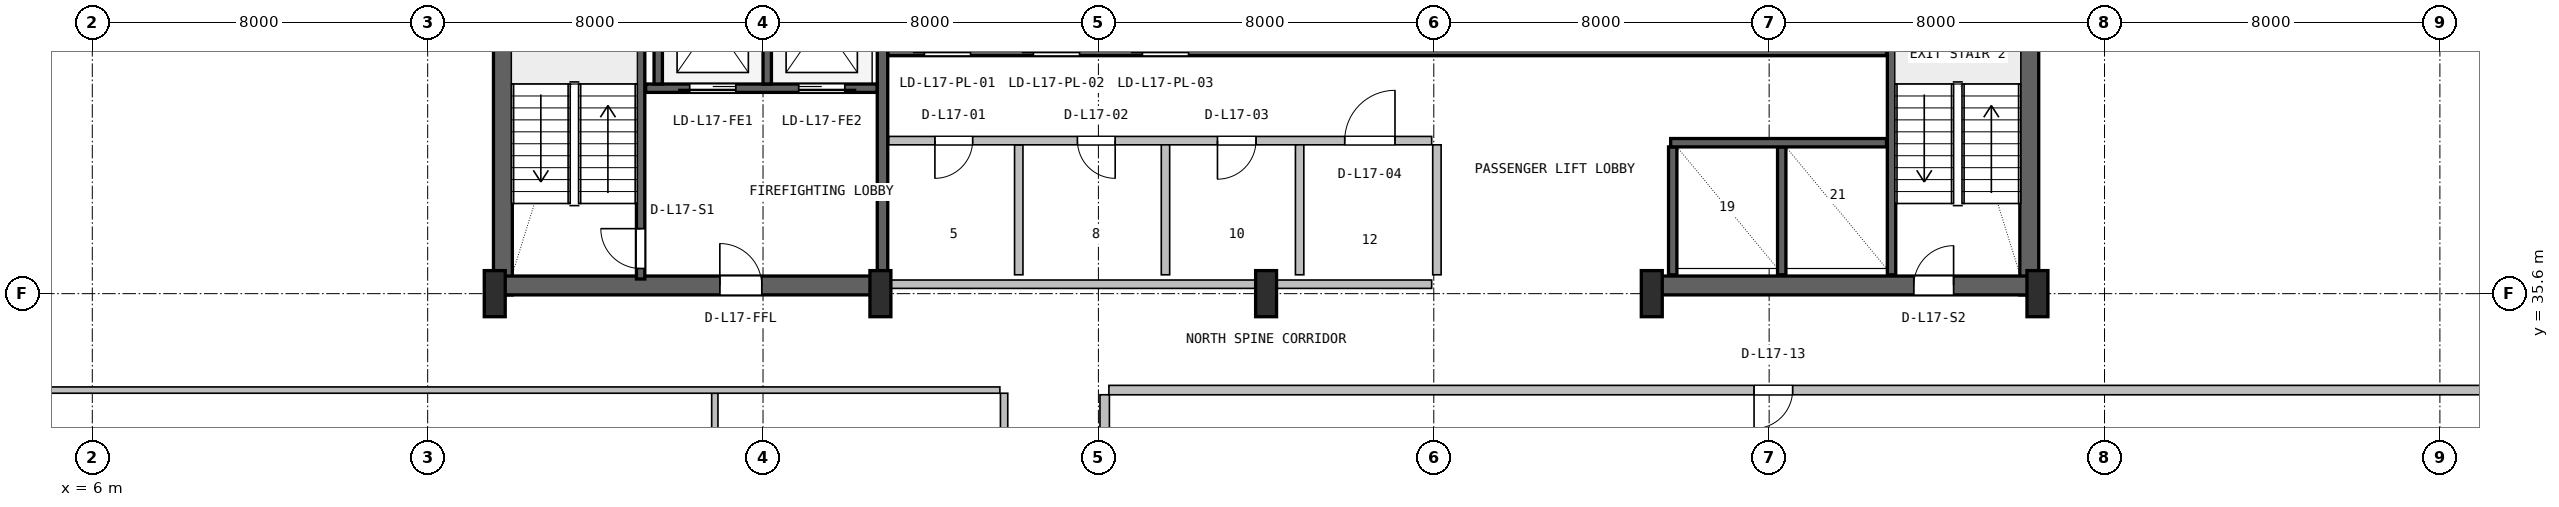
"""IFC4 building model, lengths in metres.
Left out: names, types, materials, properties, quantities, classifications, styles, units other than length and angle.
Written with IfcOpenShell. Run it as: python <this file> out.ifc"""

import sys

from ifc_helpers import new_model, si_unit, direction, frame, frame_2d, origin, origin_2d, place, context, subcontext, project, spatial, rectangle, i_section, extrude, source, transform, mapped, element, fill, save


model = new_model("IFC4")
c1 = context("Model", 3, precision=1e-05, world=origin(), true_north=direction((0.0, 1.0)))
c2 = subcontext(c1, "Body", "Model", "MODEL_VIEW")
j1 = project(units=[si_unit("LENGTHUNIT", "METRE"), si_unit("PLANEANGLEUNIT", "RADIAN")], contexts=[c1])
p1 = place(None, origin())
s1 = spatial("IfcSite", under=j1, at=p1, CompositionType="ELEMENT")
p2 = place(p1, origin())
s2 = spatial("IfcBuilding", under=s1, at=p2, CompositionType="ELEMENT")
p3 = place(p2, frame((0.0, 0.0, 74.4)))
s3 = spatial("IfcBuildingStorey", under=s2, at=p3, CompositionType="ELEMENT", Elevation=74.4)
for number, where, z_axis, x_axis in (
    (1, (15.795, 35.57, 0.0), (0.0, 0.0, 1.0), (0.0, 1.0, 0.0)),
    (2, (52.205, 35.57, 0.0), (0.0, 0.0, 1.0), (0.0, 1.0, 0.0)),
):
    element("IfcWall", number, at=place(p3, frame(where, z_axis=z_axis, x_axis=x_axis)), inside=s3, PredefinedType="SHEAR", context=c2, shape_type="SweptSolid", body=[
        extrude(rectangle(XDim=11.23, YDim=0.45, at=frame_2d((5.615, 0.0))), origin(), (0.0, 0.0, 1.0), 3.65),
    ])
p4 = place(p3, frame((15.57, 35.795, 0.0), z_axis=(0.0, 0.0, 1.0), x_axis=(1.0, 0.0, 0.0)))
e3 = element("IfcWall", 3, at=p4, inside=s3, PredefinedType="SHEAR", context=c2, shape_type="SweptSolid", body=[
    extrude(rectangle(XDim=9.23, YDim=0.45, at=frame_2d((4.615, 0.0))), origin(), (0.0, 0.0, 1.0), 3.65),
])
p5 = place(p4, frame((5.4, 0.0, 0.0)))
e4 = element("IfcOpeningElement", 4, at=p5, cuts=e3, PredefinedType="OPENING", context=c2, shape_type="SweptSolid", body=[
    extrude(rectangle(XDim=1.0, YDim=2.1, at=frame_2d((0.5, 1.05))), frame((0.0, 0.235, 0.0), z_axis=(0.0, -1.0, 0.0), x_axis=(1.0, 0.0, 0.0)), (0.0, 0.0, 1.0), 0.47),
])
p6 = place(p3, frame((43.2, 35.795, 0.0), z_axis=(0.0, 0.0, 1.0), x_axis=(1.0, 0.0, 0.0)))
e5 = element("IfcWall", 5, at=p6, inside=s3, PredefinedType="SHEAR", context=c2, shape_type="SweptSolid", body=[
    extrude(rectangle(XDim=9.23, YDim=0.45, at=frame_2d((4.615, 0.0))), origin(), (0.0, 0.0, 1.0), 3.65),
])
p7 = place(p6, frame((6.25, 0.0, 0.0)))
e6 = element("IfcOpeningElement", 6, at=p7, cuts=e5, PredefinedType="OPENING", context=c2, shape_type="SweptSolid", body=[
    extrude(rectangle(XDim=0.95, YDim=2.1, at=frame_2d((0.475, 1.05))), frame((0.0, 0.235, 0.0), z_axis=(0.0, -1.0, 0.0), x_axis=(1.0, 0.0, 0.0)), (0.0, 0.0, 1.0), 0.47),
])
m1 = source(origin(), c2, "Body", "SweptSolid", [
    extrude(i_section(OverallWidth=0.5, OverallDepth=1.1, WebThickness=0.018, FlangeThickness=0.032, FilletRadius=0.018, at=origin_2d()), origin(), (0.0, 0.0, 1.0), 3.9),
])
for number, where, z_axis, x_axis in (
    (7, (15.6, 35.6, 0.0), (0.0, 0.0, 1.0), (1.0, 0.0, 0.0)),
    (8, (24.8, 35.6, 0.0), (0.0, 0.0, 1.0), (1.0, 0.0, 0.0)),
    (9, (34.0, 35.6, 0.0), (0.0, 0.0, 1.0), (1.0, 0.0, 0.0)),
    (10, (43.2, 35.6, 0.0), (0.0, 0.0, 1.0), (1.0, 0.0, 0.0)),
    (11, (52.4, 35.6, 0.0), (0.0, 0.0, 1.0), (1.0, 0.0, 0.0)),
):
    element("IfcColumn", number, at=place(p3, frame(where, z_axis=z_axis, x_axis=x_axis)), inside=s3, PredefinedType="COLUMN", context=c2, shape_type="MappedRepresentation", body=[
        mapped(m1, transform((0.0, 0.0, 0.0), x_axis=(1.0, 0.0, 0.0), y_axis=(0.0, 1.0, 0.0), z_axis=(0.0, 0.0, 1.0), scale=1.0)),
    ])
p8 = place(p3, frame((19.08, 35.95, 0.0), z_axis=(0.0, 0.0, 1.0), x_axis=(0.0, 1.0, 0.0)))
e12 = element("IfcWall", 12, at=p8, inside=s3, PredefinedType="SHEAR", context=c2, shape_type="SweptSolid", body=[
    extrude(rectangle(XDim=9.65, YDim=0.2, at=frame_2d((4.825, 0.0))), origin(), (0.0, 0.0, 1.0), 3.65),
])
p9 = place(p8, frame((0.25, 0.0, 0.0)))
e13 = element("IfcOpeningElement", 13, at=p9, cuts=e12, PredefinedType="OPENING", context=c2, shape_type="SweptSolid", body=[
    extrude(rectangle(XDim=0.95, YDim=2.1, at=frame_2d((0.475, 1.05))), frame((0.0, 0.11, 0.0), z_axis=(0.0, -1.0, 0.0), x_axis=(1.0, 0.0, 0.0)), (0.0, 0.0, 1.0), 0.22),
])
p10 = place(p3, frame((24.85, 36.05, 0.0), z_axis=(0.0, 0.0, 1.0), x_axis=(0.0, 1.0, 0.0)))
e14 = element("IfcWall", 14, at=p10, inside=s3, PredefinedType="SHEAR", context=c2, shape_type="SweptSolid", body=[
    extrude(rectangle(XDim=10.45, YDim=0.25, at=frame_2d((5.225, 0.0))), origin(), (0.0, 0.0, 1.0), 3.65),
])
p11 = place(p3, frame((19.2, 40.5, 0.0), z_axis=(0.0, 0.0, 1.0), x_axis=(1.0, 0.0, 0.0)))
e15 = element("IfcWall", 15, at=p11, inside=s3, PredefinedType="SHEAR", context=c2, shape_type="SweptSolid", body=[
    extrude(rectangle(XDim=5.52, YDim=0.2, at=frame_2d((2.76, 0.0))), origin(), (0.0, 0.0, 1.0), 3.65),
])
p12 = place(p11, frame((1.05, 0.0, 0.0)))
e16 = element("IfcOpeningElement", 16, at=p12, cuts=e15, PredefinedType="OPENING", context=c2, shape_type="SweptSolid", body=[
    extrude(rectangle(XDim=1.1, YDim=2.18, at=frame_2d((0.55, 1.09))), frame((0.0, 0.11, 0.0), z_axis=(0.0, -1.0, 0.0), x_axis=(1.0, 0.0, 0.0)), (0.0, 0.0, 1.0), 0.22),
])
p13 = place(p11, frame((3.65, 0.0, 0.0)))
e17 = element("IfcOpeningElement", 17, at=p13, cuts=e15, PredefinedType="OPENING", context=c2, shape_type="SweptSolid", body=[
    extrude(rectangle(XDim=1.1, YDim=2.18, at=frame_2d((0.55, 1.09))), frame((0.0, 0.11, 0.0), z_axis=(0.0, -1.0, 0.0), x_axis=(1.0, 0.0, 0.0)), (0.0, 0.0, 1.0), 0.22),
])
p14 = place(p3, frame((22.1, 40.6, 0.0), z_axis=(0.0, 0.0, 1.0), x_axis=(0.0, 1.0, 0.0)))
e18 = element("IfcWall", 18, at=p14, inside=s3, PredefinedType="SHEAR", context=c2, shape_type="SweptSolid", body=[
    extrude(rectangle(XDim=3.0, YDim=0.2, at=frame_2d((1.5, 0.0))), origin(), (0.0, 0.0, 1.0), 3.65),
])
p15 = place(p3, frame((19.5, 40.6, 0.0), z_axis=(0.0, 0.0, 1.0), x_axis=(0.0, 1.0, 0.0)))
e19 = element("IfcWall", 19, at=p15, inside=s3, PredefinedType="SHEAR", context=c2, shape_type="SweptSolid", body=[
    extrude(rectangle(XDim=5.95, YDim=0.2, at=frame_2d((2.975, 0.0))), origin(), (0.0, 0.0, 1.0), 3.65),
])
p16 = place(p3, frame((48.92, 36.05, 0.0), z_axis=(0.0, 0.0, 1.0), x_axis=(0.0, 1.0, 0.0)))
e20 = element("IfcWall", 20, at=p16, inside=s3, PredefinedType="SHEAR", context=c2, shape_type="SweptSolid", body=[
    extrude(rectangle(XDim=10.5, YDim=0.2, at=frame_2d((5.25, 0.0))), origin(), (0.0, 0.0, 1.0), 3.65),
])
p17 = place(p3, frame((24.98, 41.4, 0.0), z_axis=(0.0, 0.0, 1.0), x_axis=(1.0, 0.0, 0.0)))
e21 = element("IfcWall", 21, at=p17, inside=s3, PredefinedType="SHEAR", context=c2, shape_type="SweptSolid", body=[
    extrude(rectangle(XDim=23.82, YDim=0.25, at=frame_2d((11.91, 0.0))), origin(), (0.0, 0.0, 1.0), 3.65),
])
p18 = place(p17, frame((0.87, 0.0, 0.0)))
e22 = element("IfcOpeningElement", 22, at=p18, cuts=e21, PredefinedType="OPENING", context=c2, shape_type="SweptSolid", body=[
    extrude(rectangle(XDim=1.1, YDim=2.18, at=frame_2d((0.55, 1.09))), frame((0.0, 0.135, 0.0), z_axis=(0.0, -1.0, 0.0), x_axis=(1.0, 0.0, 0.0)), (0.0, 0.0, 1.0), 0.27),
])
p19 = place(p17, frame((3.47, 0.0, 0.0)))
e23 = element("IfcOpeningElement", 23, at=p19, cuts=e21, PredefinedType="OPENING", context=c2, shape_type="SweptSolid", body=[
    extrude(rectangle(XDim=1.1, YDim=2.18, at=frame_2d((0.55, 1.09))), frame((0.0, 0.135, 0.0), z_axis=(0.0, -1.0, 0.0), x_axis=(1.0, 0.0, 0.0)), (0.0, 0.0, 1.0), 0.27),
])
p20 = place(p17, frame((6.07, 0.0, 0.0)))
e24 = element("IfcOpeningElement", 24, at=p20, cuts=e21, PredefinedType="OPENING", context=c2, shape_type="SweptSolid", body=[
    extrude(rectangle(XDim=1.1, YDim=2.18, at=frame_2d((0.55, 1.09))), frame((0.0, 0.135, 0.0), z_axis=(0.0, -1.0, 0.0), x_axis=(1.0, 0.0, 0.0)), (0.0, 0.0, 1.0), 0.27),
])
for number, where, z_axis, x_axis in (
    (25, (43.7, 36.05, 0.0), (0.0, 0.0, 1.0), (0.0, 1.0, 0.0)),
    (26, (46.3, 36.05, 0.0), (0.0, 0.0, 1.0), (0.0, 1.0, 0.0)),
):
    element("IfcWall", number, at=place(p3, frame(where, z_axis=z_axis, x_axis=x_axis)), inside=s3, PredefinedType="SHEAR", context=c2, shape_type="SweptSolid", body=[
        extrude(rectangle(XDim=3.05, YDim=0.2, at=frame_2d((1.525, 0.0))), origin(), (0.0, 0.0, 1.0), 3.65),
    ])
p21 = place(p3, frame((43.65, 39.2, 0.0), z_axis=(0.0, 0.0, 1.0), x_axis=(1.0, 0.0, 0.0)))
e27 = element("IfcWall", 27, at=p21, inside=s3, PredefinedType="SHEAR", context=c2, shape_type="SweptSolid", body=[
    extrude(rectangle(XDim=5.15, YDim=0.2, at=frame_2d((2.575, 0.0))), origin(), (0.0, 0.0, 1.0), 3.65),
])
p22 = place(p3, frame((25.0, 35.825, 0.0), z_axis=(0.0, 0.0, 1.0), x_axis=(1.0, 0.0, 0.0)))
e28 = element("IfcWall", 28, at=p22, inside=s3, PredefinedType="SOLIDWALL", context=c2, shape_type="SweptSolid", body=[
    extrude(rectangle(XDim=12.95, YDim=0.2, at=frame_2d((6.475, 0.0))), origin(), (0.0, 0.0, 1.0), 2.425),
])
p23 = place(p3, frame((28.1, 36.05, 0.0), z_axis=(0.0, 0.0, 1.0), x_axis=(0.0, 1.0, 0.0)))
e29 = element("IfcWall", 29, at=p23, inside=s3, PredefinedType="PLUMBINGWALL", context=c2, shape_type="SweptSolid", body=[
    extrude(rectangle(XDim=3.1, YDim=0.2, at=frame_2d((1.55, 0.0))), origin(), (0.0, 0.0, 1.0), 3.63),
])
p24 = place(p3, frame((25.0, 39.25, 0.0), z_axis=(0.0, 0.0, 1.0), x_axis=(1.0, 0.0, 0.0)))
e30 = element("IfcWall", 30, at=p24, inside=s3, PredefinedType="SOLIDWALL", context=c2, shape_type="SweptSolid", body=[
    extrude(rectangle(XDim=12.95, YDim=0.2, at=frame_2d((6.475, 0.0))), origin(), (0.0, 0.0, 1.0), 3.63),
])
p25 = place(p24, frame((1.1, 0.0, 0.0)))
e31 = element("IfcOpeningElement", 31, at=p25, cuts=e30, PredefinedType="OPENING", context=c2, shape_type="SweptSolid", body=[
    extrude(rectangle(XDim=0.9, YDim=2.06, at=frame_2d((0.45, 1.03))), frame((0.0, 0.11, 0.0), z_axis=(0.0, -1.0, 0.0), x_axis=(1.0, 0.0, 0.0)), (0.0, 0.0, 1.0), 0.22),
])
p26 = place(p24, frame((4.5, 0.0, 0.0)))
e32 = element("IfcOpeningElement", 32, at=p26, cuts=e30, PredefinedType="OPENING", context=c2, shape_type="SweptSolid", body=[
    extrude(rectangle(XDim=0.9, YDim=2.06, at=frame_2d((0.45, 1.03))), frame((0.0, 0.11, 0.0), z_axis=(0.0, -1.0, 0.0), x_axis=(1.0, 0.0, 0.0)), (0.0, 0.0, 1.0), 0.22),
])
p27 = place(p24, frame((7.84, 0.0, 0.0)))
e33 = element("IfcOpeningElement", 33, at=p27, cuts=e30, PredefinedType="OPENING", context=c2, shape_type="SweptSolid", body=[
    extrude(rectangle(XDim=0.92, YDim=2.08, at=frame_2d((0.46, 1.04))), frame((0.0, 0.11, 0.0), z_axis=(0.0, -1.0, 0.0), x_axis=(1.0, 0.0, 0.0)), (0.0, 0.0, 1.0), 0.22),
])
p28 = place(p24, frame((10.875, 0.0, 0.0)))
e34 = element("IfcOpeningElement", 34, at=p28, cuts=e30, PredefinedType="OPENING", context=c2, shape_type="SweptSolid", body=[
    extrude(rectangle(XDim=1.2, YDim=2.1, at=frame_2d((0.6, 1.05))), frame((0.0, 0.11, 0.0), z_axis=(0.0, -1.0, 0.0), x_axis=(1.0, 0.0, 0.0)), (0.0, 0.0, 1.0), 0.22),
])
p29 = place(p3, frame((31.6, 36.05, 0.0), z_axis=(0.0, 0.0, 1.0), x_axis=(0.0, 1.0, 0.0)))
e35 = element("IfcWall", 35, at=p29, inside=s3, PredefinedType="PLUMBINGWALL", context=c2, shape_type="SweptSolid", body=[
    extrude(rectangle(XDim=3.1, YDim=0.2, at=frame_2d((1.55, 0.0))), origin(), (0.0, 0.0, 1.0), 3.63),
])
for number, where, z_axis, x_axis in (
    (36, (34.8, 36.05, 0.0), (0.0, 0.0, 1.0), (0.0, 1.0, 0.0)),
    (37, (38.075, 36.05, 0.0), (0.0, 0.0, 1.0), (0.0, 1.0, 0.0)),
):
    element("IfcWall", number, at=place(p3, frame(where, z_axis=z_axis, x_axis=x_axis)), inside=s3, PredefinedType="SOLIDWALL", context=c2, shape_type="SweptSolid", body=[
        extrude(rectangle(XDim=3.1, YDim=0.2, at=frame_2d((1.55, 0.0))), origin(), (0.0, 0.0, 1.0), 3.63),
    ])
p30 = place(p3, frame((20.85, 18.355, 0.0), z_axis=(0.0, 0.0, 1.0), x_axis=(0.0, 1.0, 0.0)))
e38 = element("IfcWall", 38, at=p30, inside=s3, PredefinedType="PARTITIONING", context=c2, shape_type="SweptSolid", body=[
    extrude(rectangle(XDim=14.87, YDim=0.15, at=frame_2d((7.435, 0.0))), origin(), (0.0, 0.0, 1.0), 3.322),
])
p31 = place(p3, frame((2.18, 33.3, 0.0), z_axis=(0.0, 0.0, 1.0), x_axis=(1.0, 0.0, 0.0)))
e39 = element("IfcWall", 39, at=p31, inside=s3, PredefinedType="PARTITIONING", context=c2, shape_type="SweptSolid", body=[
    extrude(rectangle(XDim=25.47, YDim=0.15, at=frame_2d((12.735, 0.0))), origin(), (0.0, 0.0, 1.0), 2.852),
])
p32 = place(p3, frame((27.75, 18.355, 0.0), z_axis=(0.0, 0.0, 1.0), x_axis=(0.0, 1.0, 0.0)))
e40 = element("IfcWall", 40, at=p32, inside=s3, PredefinedType="PARTITIONING", context=c2, shape_type="SweptSolid", body=[
    extrude(rectangle(XDim=14.87, YDim=0.175, at=frame_2d((7.435, 0.0))), origin(), (0.0, 0.0, 1.0), 2.852),
])
p33 = place(p32, frame((6.91, 0.0, 0.0)))
e41 = element("IfcOpeningElement", 41, at=p33, cuts=e40, PredefinedType="OPENING", context=c2, shape_type="SweptSolid", body=[
    extrude(rectangle(XDim=1.05, YDim=2.1, at=frame_2d((0.525, 1.05))), frame((0.0, 0.098, 0.0), z_axis=(0.0, -1.0, 0.0), x_axis=(1.0, 0.0, 0.0)), (0.0, 0.0, 1.0), 0.195),
])
p34 = place(p3, frame((30.15, 1.38, 0.0), z_axis=(0.0, 0.0, 1.0), x_axis=(0.0, 1.0, 0.0)))
e42 = element("IfcWall", 42, at=p34, inside=s3, PredefinedType="PARTITIONING", context=c2, shape_type="SweptSolid", body=[
    extrude(rectangle(XDim=31.808, YDim=0.225, at=frame_2d((15.904, 0.0))), origin(), (0.0, 0.0, 1.0), 2.852),
])
p35 = place(p34, frame((4.76, 0.0, 0.0)))
e43 = element("IfcOpeningElement", 43, at=p35, cuts=e42, PredefinedType="OPENING", context=c2, shape_type="SweptSolid", body=[
    extrude(rectangle(XDim=1.4, YDim=2.12, at=frame_2d((0.7, 1.06))), frame((0.0, 0.123, 0.0), z_axis=(0.0, -1.0, 0.0), x_axis=(1.0, 0.0, 0.0)), (0.0, 0.0, 1.0), 0.245),
])
p36 = place(p34, frame((11.825, 0.0, 0.0)))
e44 = element("IfcOpeningElement", 44, at=p36, cuts=e42, PredefinedType="OPENING", context=c2, shape_type="SweptSolid", body=[
    extrude(rectangle(XDim=1.4, YDim=2.12, at=frame_2d((0.7, 1.06))), frame((0.0, 0.123, 0.0), z_axis=(0.0, -1.0, 0.0), x_axis=(1.0, 0.0, 0.0)), (0.0, 0.0, 1.0), 0.245),
])
p37 = place(p34, frame((18.035, 0.0, 0.0)))
e45 = element("IfcOpeningElement", 45, at=p37, cuts=e42, PredefinedType="OPENING", context=c2, shape_type="SweptSolid", body=[
    extrude(rectangle(XDim=1.4, YDim=2.12, at=frame_2d((0.7, 1.06))), frame((0.0, 0.123, 0.0), z_axis=(0.0, -1.0, 0.0), x_axis=(1.0, 0.0, 0.0)), (0.0, 0.0, 1.0), 0.245),
])
p38 = place(p3, frame((30.25, 33.3, 0.0), z_axis=(0.0, 0.0, 1.0), x_axis=(1.0, 0.0, 0.0)))
e46 = element("IfcWall", 46, at=p38, inside=s3, PredefinedType="PARTITIONING", context=c2, shape_type="SweptSolid", body=[
    extrude(rectangle(XDim=35.57, YDim=0.225, at=frame_2d((17.785, 0.0))), origin(), (0.0, 0.0, 1.0), 2.852),
])
p39 = place(p38, frame((15.39, 0.0, 0.0)))
e47 = element("IfcOpeningElement", 47, at=p39, cuts=e46, PredefinedType="OPENING", context=c2, shape_type="SweptSolid", body=[
    extrude(rectangle(XDim=0.92, YDim=2.08, at=frame_2d((0.46, 1.04))), frame((0.0, 0.123, 0.0), z_axis=(0.0, -1.0, 0.0), x_axis=(1.0, 0.0, 0.0)), (0.0, 0.0, 1.0), 0.245),
])
m2 = source(origin(), c2, "Body", "SweptSolid", [
    extrude(rectangle(XDim=0.95, YDim=2.1, at=frame_2d((0.475, 1.05))), frame((0.0, 0.025, 0.0), z_axis=(0.0, -1.0, 0.0), x_axis=(1.0, 0.0, 0.0)), (0.0, 0.0, 1.0), 0.05),
])
p40 = place(p9, origin())
e48 = element("IfcDoor", 48, at=p40, inside=s3, OperationType="SINGLE_SWING_RIGHT", PredefinedType="DOOR", context=c2, shape_type="MappedRepresentation", body=[
    mapped(m2, transform((0.0, 0.0, 0.0), x_axis=(1.0, 0.0, 0.0), y_axis=(0.0, 1.0, 0.0), z_axis=(0.0, 0.0, 1.0), scale=1.0)),
])
fill(e13, e48)
m3 = source(origin(), c2, "Body", "SweptSolid", [
    extrude(rectangle(XDim=1.0, YDim=2.1, at=frame_2d((0.5, 1.05))), frame((0.0, 0.025, 0.0), z_axis=(0.0, -1.0, 0.0), x_axis=(1.0, 0.0, 0.0)), (0.0, 0.0, 1.0), 0.05),
])
p41 = place(p5, origin())
e49 = element("IfcDoor", 49, at=p41, inside=s3, OperationType="SINGLE_SWING_LEFT", PredefinedType="DOOR", context=c2, shape_type="MappedRepresentation", body=[
    mapped(m3, transform((0.0, 0.0, 0.0), x_axis=(1.0, 0.0, 0.0), y_axis=(0.0, 1.0, 0.0), z_axis=(0.0, 0.0, 1.0), scale=1.0)),
])
fill(e4, e49)
m4 = source(origin(), c2, "Body", "SweptSolid", [
    extrude(rectangle(XDim=1.1, YDim=2.18, at=frame_2d((0.55, 1.09))), frame((0.0, 0.025, 0.0), z_axis=(0.0, -1.0, 0.0), x_axis=(1.0, 0.0, 0.0)), (0.0, 0.0, 1.0), 0.05),
])
p42 = place(p12, frame((1.1, 0.0, 0.0), z_axis=(0.0, 0.0, 1.0), x_axis=(-1.0, 0.0, 0.0)))
e50 = element("IfcDoor", 50, at=p42, inside=s3, OperationType="SLIDING_TO_LEFT", PredefinedType="DOOR", context=c2, shape_type="MappedRepresentation", body=[
    mapped(m4, transform((0.0, 0.0, 0.0), x_axis=(1.0, 0.0, 0.0), y_axis=(0.0, 1.0, 0.0), z_axis=(0.0, 0.0, 1.0), scale=1.0)),
])
fill(e16, e50)
p43 = place(p13, frame((1.1, 0.0, 0.0), z_axis=(0.0, 0.0, 1.0), x_axis=(-1.0, 0.0, 0.0)))
e51 = element("IfcDoor", 51, at=p43, inside=s3, OperationType="SLIDING_TO_RIGHT", PredefinedType="DOOR", context=c2, shape_type="MappedRepresentation", body=[
    mapped(m4, transform((0.0, 0.0, 0.0), x_axis=(1.0, 0.0, 0.0), y_axis=(0.0, 1.0, 0.0), z_axis=(0.0, 0.0, 1.0), scale=1.0)),
])
fill(e17, e51)
p44 = place(p7, origin())
e52 = element("IfcDoor", 52, at=p44, inside=s3, OperationType="SINGLE_SWING_RIGHT", PredefinedType="DOOR", context=c2, shape_type="MappedRepresentation", body=[
    mapped(m2, transform((0.0, 0.0, 0.0), x_axis=(1.0, 0.0, 0.0), y_axis=(0.0, 1.0, 0.0), z_axis=(0.0, 0.0, 1.0), scale=1.0)),
])
fill(e6, e52)
m5 = source(origin(), c2, "Body", "SweptSolid", [
    extrude(rectangle(XDim=0.9, YDim=2.06, at=frame_2d((0.45, 1.03))), frame((0.0, 0.025, 0.0), z_axis=(0.0, -1.0, 0.0), x_axis=(1.0, 0.0, 0.0)), (0.0, 0.0, 1.0), 0.05),
])
p45 = place(p25, frame((0.9, 0.0, 0.0), z_axis=(0.0, 0.0, 1.0), x_axis=(-1.0, 0.0, 0.0)))
e53 = element("IfcDoor", 53, at=p45, inside=s3, OperationType="SINGLE_SWING_LEFT", PredefinedType="DOOR", context=c2, shape_type="MappedRepresentation", body=[
    mapped(m5, transform((0.0, 0.0, 0.0), x_axis=(1.0, 0.0, 0.0), y_axis=(0.0, 1.0, 0.0), z_axis=(0.0, 0.0, 1.0), scale=1.0)),
])
fill(e31, e53)
p46 = place(p26, frame((0.9, 0.0, 0.0), z_axis=(0.0, 0.0, 1.0), x_axis=(-1.0, 0.0, 0.0)))
e54 = element("IfcDoor", 54, at=p46, inside=s3, OperationType="SINGLE_SWING_RIGHT", PredefinedType="DOOR", context=c2, shape_type="MappedRepresentation", body=[
    mapped(m5, transform((0.0, 0.0, 0.0), x_axis=(1.0, 0.0, 0.0), y_axis=(0.0, 1.0, 0.0), z_axis=(0.0, 0.0, 1.0), scale=1.0)),
])
fill(e32, e54)
m6 = source(origin(), c2, "Body", "SweptSolid", [
    extrude(rectangle(XDim=0.92, YDim=2.08, at=frame_2d((0.46, 1.04))), frame((0.0, 0.025, 0.0), z_axis=(0.0, -1.0, 0.0), x_axis=(1.0, 0.0, 0.0)), (0.0, 0.0, 1.0), 0.05),
])
p47 = place(p27, frame((0.92, 0.0, 0.0), z_axis=(0.0, 0.0, 1.0), x_axis=(-1.0, 0.0, 0.0)))
e55 = element("IfcDoor", 55, at=p47, inside=s3, OperationType="SINGLE_SWING_LEFT", PredefinedType="DOOR", context=c2, shape_type="MappedRepresentation", body=[
    mapped(m6, transform((0.0, 0.0, 0.0), x_axis=(1.0, 0.0, 0.0), y_axis=(0.0, 1.0, 0.0), z_axis=(0.0, 0.0, 1.0), scale=1.0)),
])
fill(e33, e55)
m7 = source(origin(), c2, "Body", "SweptSolid", [
    extrude(rectangle(XDim=1.2, YDim=2.1, at=frame_2d((0.6, 1.05))), frame((0.0, 0.025, 0.0), z_axis=(0.0, -1.0, 0.0), x_axis=(1.0, 0.0, 0.0)), (0.0, 0.0, 1.0), 0.05),
])
p48 = place(p28, origin())
e56 = element("IfcDoor", 56, at=p48, inside=s3, OperationType="SINGLE_SWING_RIGHT", PredefinedType="DOOR", context=c2, shape_type="MappedRepresentation", body=[
    mapped(m7, transform((0.0, 0.0, 0.0), x_axis=(1.0, 0.0, 0.0), y_axis=(0.0, 1.0, 0.0), z_axis=(0.0, 0.0, 1.0), scale=1.0)),
])
fill(e34, e56)
p49 = place(p39, frame((0.92, 0.0, 0.0), z_axis=(0.0, 0.0, 1.0), x_axis=(-1.0, 0.0, 0.0)))
e57 = element("IfcDoor", 57, at=p49, inside=s3, OperationType="SINGLE_SWING_LEFT", PredefinedType="DOOR", context=c2, shape_type="MappedRepresentation", body=[
    mapped(m6, transform((0.0, 0.0, 0.0), x_axis=(1.0, 0.0, 0.0), y_axis=(0.0, 1.0, 0.0), z_axis=(0.0, 0.0, 1.0), scale=1.0)),
])
fill(e47, e57)
save(model, sys.argv[1])
